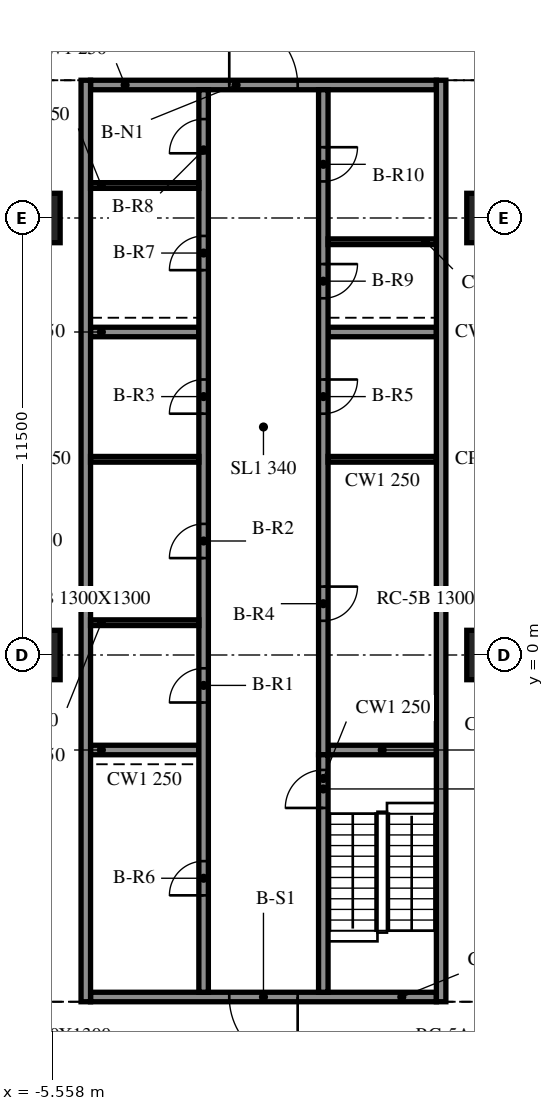
"""IFC4 building model, lengths in metres.
Left out: names, types, materials, properties, quantities, classifications, styles, units other than length and angle.
Written with IfcOpenShell. Run it as: python <this file> out.ifc"""

import sys

from ifc_helpers import new_model, si_unit, direction, frame, frame_2d, origin, origin_2d, place, context, subcontext, project, spatial, rectangle, extrude, element, fill, save


model = new_model("IFC4")
c1 = context("Model", 3, precision=1e-05, world=origin(), true_north=direction((0.0, 1.0)))
c2 = subcontext(c1, "Body", "Model", "MODEL_VIEW")
j1 = project(units=[si_unit("LENGTHUNIT", "METRE"), si_unit("PLANEANGLEUNIT", "RADIAN")], contexts=[c1])
p1 = place(None, origin())
s1 = spatial("IfcSite", under=j1, at=p1, CompositionType="ELEMENT")
p2 = place(p1, origin())
s2 = spatial("IfcBuilding", under=s1, at=p2, CompositionType="ELEMENT")
p3 = place(p2, frame((0.0, 0.0, 126.1)))
s3 = spatial("IfcBuildingStorey", under=s2, at=p3, CompositionType="ELEMENT", Elevation=126.1)
for number, where, z_axis, x_axis in (
    (1, (-6.0, 0.0, -0.34), (0.0, 0.0, 1.0), (1.0, 0.0, 0.0)),
    (2, (-6.0, 11.5, -0.34), (0.0, 0.0, 1.0), (1.0, 0.0, 0.0)),
    (3, (6.0, 0.0, -0.34), (0.0, 0.0, 1.0), (1.0, 0.0, 0.0)),
    (4, (6.0, 11.5, -0.34), (0.0, 0.0, 1.0), (1.0, 0.0, 0.0)),
):
    element("IfcColumn", number, at=place(p3, frame(where, z_axis=z_axis, x_axis=x_axis)), inside=s3, PredefinedType="COLUMN", context=c2, shape_type="SweptSolid", body=[
        extrude(rectangle(XDim=1.3, YDim=1.3, at=origin_2d()), origin(), (0.0, 0.0, 1.0), 4.1),
    ])
for number, where, z_axis, x_axis in (
    (5, (-4.675, 15.125, 0.0), (0.0, 0.0, 1.0), (0.0, -1.0, 0.0)),
    (6, (4.675, -9.125, 0.0), (0.0, 0.0, 1.0), (0.0, 1.0, 0.0)),
):
    element("IfcWall", number, at=place(p3, frame(where, z_axis=z_axis, x_axis=x_axis)), inside=s3, PredefinedType="SOLIDWALL", context=c2, shape_type="SweptSolid", body=[
        extrude(rectangle(XDim=24.25, YDim=0.25, at=frame_2d((12.125, 0.0))), origin(), (0.0, 0.0, 1.0), 3.76),
    ])
p4 = place(p3, frame((4.55, -9.0, 0.0), z_axis=(0.0, 0.0, 1.0), x_axis=(-1.0, 0.0, 0.0)))
e7 = element("IfcWall", 7, at=p4, inside=s3, PredefinedType="SOLIDWALL", context=c2, shape_type="SweptSolid", body=[
    extrude(rectangle(XDim=9.1, YDim=0.25, at=frame_2d((4.55, 0.0))), origin(), (0.0, 0.0, 1.0), 3.76),
])
p5 = place(p4, frame((3.65, 0.0, 0.0)))
e8 = element("IfcOpeningElement", 8, at=p5, cuts=e7, PredefinedType="OPENING", context=c2, shape_type="SweptSolid", body=[
    extrude(rectangle(XDim=1.8, YDim=2.1, at=frame_2d((0.9, 1.05))), frame((0.0, 0.135, 0.0), z_axis=(0.0, -1.0, 0.0), x_axis=(1.0, 0.0, 0.0)), (0.0, 0.0, 1.0), 0.27),
])
p6 = place(p3, frame((-4.55, 15.0, 0.0), z_axis=(0.0, 0.0, 1.0), x_axis=(1.0, 0.0, 0.0)))
e9 = element("IfcWall", 9, at=p6, inside=s3, PredefinedType="SOLIDWALL", context=c2, shape_type="SweptSolid", body=[
    extrude(rectangle(XDim=9.1, YDim=0.25, at=frame_2d((4.55, 0.0))), origin(), (0.0, 0.0, 1.0), 3.76),
])
p7 = place(p6, frame((3.65, 0.0, 0.0)))
e10 = element("IfcOpeningElement", 10, at=p7, cuts=e9, PredefinedType="OPENING", context=c2, shape_type="SweptSolid", body=[
    extrude(rectangle(XDim=1.8, YDim=2.1, at=frame_2d((0.9, 1.05))), frame((0.0, 0.135, 0.0), z_axis=(0.0, -1.0, 0.0), x_axis=(1.0, 0.0, 0.0)), (0.0, 0.0, 1.0), 0.27),
])
p8 = place(p3, frame((-1.575, -8.875, 0.0), z_axis=(0.0, 0.0, 1.0), x_axis=(0.0, 1.0, 0.0)))
e11 = element("IfcWall", 11, at=p8, inside=s3, PredefinedType="SOLIDWALL", context=c2, shape_type="SweptSolid", body=[
    extrude(rectangle(XDim=23.75, YDim=0.25, at=frame_2d((11.875, 0.0))), origin(), (0.0, 0.0, 1.0), 3.76),
])
p9 = place(p8, frame((7.625, 0.0, 0.0)))
e12 = element("IfcOpeningElement", 12, at=p9, cuts=e11, PredefinedType="OPENING", context=c2, shape_type="SweptSolid", body=[
    extrude(rectangle(XDim=0.9, YDim=2.1, at=frame_2d((0.45, 1.05))), frame((0.0, 0.135, 0.0), z_axis=(0.0, -1.0, 0.0), x_axis=(1.0, 0.0, 0.0)), (0.0, 0.0, 1.0), 0.27),
])
p10 = place(p8, frame((11.425, 0.0, 0.0)))
e13 = element("IfcOpeningElement", 13, at=p10, cuts=e11, PredefinedType="OPENING", context=c2, shape_type="SweptSolid", body=[
    extrude(rectangle(XDim=0.9, YDim=2.1, at=frame_2d((0.45, 1.05))), frame((0.0, 0.135, 0.0), z_axis=(0.0, -1.0, 0.0), x_axis=(1.0, 0.0, 0.0)), (0.0, 0.0, 1.0), 0.27),
])
p11 = place(p8, frame((15.225, 0.0, 0.0)))
e14 = element("IfcOpeningElement", 14, at=p11, cuts=e11, PredefinedType="OPENING", context=c2, shape_type="SweptSolid", body=[
    extrude(rectangle(XDim=0.9, YDim=2.1, at=frame_2d((0.45, 1.05))), frame((0.0, 0.135, 0.0), z_axis=(0.0, -1.0, 0.0), x_axis=(1.0, 0.0, 0.0)), (0.0, 0.0, 1.0), 0.27),
])
p12 = place(p8, frame((2.55, 0.0, 0.0)))
e15 = element("IfcOpeningElement", 15, at=p12, cuts=e11, PredefinedType="OPENING", context=c2, shape_type="SweptSolid", body=[
    extrude(rectangle(XDim=0.9, YDim=2.1, at=frame_2d((0.45, 1.05))), frame((0.0, 0.135, 0.0), z_axis=(0.0, -1.0, 0.0), x_axis=(1.0, 0.0, 0.0)), (0.0, 0.0, 1.0), 0.27),
])
p13 = place(p8, frame((19.002, 0.0, 0.0)))
e16 = element("IfcOpeningElement", 16, at=p13, cuts=e11, PredefinedType="OPENING", context=c2, shape_type="SweptSolid", body=[
    extrude(rectangle(XDim=0.9, YDim=2.1, at=frame_2d((0.45, 1.05))), frame((0.0, 0.135, 0.0), z_axis=(0.0, -1.0, 0.0), x_axis=(1.0, 0.0, 0.0)), (0.0, 0.0, 1.0), 0.27),
])
p14 = place(p8, frame((22.077, 0.0, 0.0)))
e17 = element("IfcOpeningElement", 17, at=p14, cuts=e11, PredefinedType="OPENING", context=c2, shape_type="SweptSolid", body=[
    extrude(rectangle(XDim=0.9, YDim=2.1, at=frame_2d((0.45, 1.05))), frame((0.0, 0.135, 0.0), z_axis=(0.0, -1.0, 0.0), x_axis=(1.0, 0.0, 0.0)), (0.0, 0.0, 1.0), 0.27),
])
p15 = place(p3, frame((1.575, -8.875, 0.0), z_axis=(0.0, 0.0, 1.0), x_axis=(0.0, 1.0, 0.0)))
e18 = element("IfcWall", 18, at=p15, inside=s3, PredefinedType="SOLIDWALL", context=c2, shape_type="SweptSolid", body=[
    extrude(rectangle(XDim=6.25, YDim=0.25, at=frame_2d((3.125, 0.0))), origin(), (0.0, 0.0, 1.0), 3.76),
])
p16 = place(p15, frame((4.85, 0.0, 0.0)))
e19 = element("IfcOpeningElement", 19, at=p16, cuts=e18, PredefinedType="OPENING", context=c2, shape_type="SweptSolid", body=[
    extrude(rectangle(XDim=1.0, YDim=2.1, at=frame_2d((0.5, 1.05))), frame((0.0, 0.135, 0.0), z_axis=(0.0, -1.0, 0.0), x_axis=(1.0, 0.0, 0.0)), (0.0, 0.0, 1.0), 0.27),
])
p17 = place(p3, frame((1.575, 14.875, 0.0), z_axis=(0.0, 0.0, 1.0), x_axis=(0.0, -1.0, 0.0)))
e20 = element("IfcWall", 20, at=p17, inside=s3, PredefinedType="SOLIDWALL", context=c2, shape_type="SweptSolid", body=[
    extrude(rectangle(XDim=17.5, YDim=0.25, at=frame_2d((8.75, 0.0))), origin(), (0.0, 0.0, 1.0), 3.76),
])
p18 = place(p17, frame((13.075, 0.0, 0.0)))
e21 = element("IfcOpeningElement", 21, at=p18, cuts=e20, PredefinedType="OPENING", context=c2, shape_type="SweptSolid", body=[
    extrude(rectangle(XDim=0.9, YDim=2.1, at=frame_2d((0.45, 1.05))), frame((0.0, 0.135, 0.0), z_axis=(0.0, -1.0, 0.0), x_axis=(1.0, 0.0, 0.0)), (0.0, 0.0, 1.0), 0.27),
])
p19 = place(p17, frame((7.625, 0.0, 0.0)))
e22 = element("IfcOpeningElement", 22, at=p19, cuts=e20, PredefinedType="OPENING", context=c2, shape_type="SweptSolid", body=[
    extrude(rectangle(XDim=0.9, YDim=2.1, at=frame_2d((0.45, 1.05))), frame((0.0, 0.135, 0.0), z_axis=(0.0, -1.0, 0.0), x_axis=(1.0, 0.0, 0.0)), (0.0, 0.0, 1.0), 0.27),
])
p20 = place(p17, frame((4.587, 0.0, 0.0)))
e23 = element("IfcOpeningElement", 23, at=p20, cuts=e20, PredefinedType="OPENING", context=c2, shape_type="SweptSolid", body=[
    extrude(rectangle(XDim=0.9, YDim=2.1, at=frame_2d((0.45, 1.05))), frame((0.0, 0.135, 0.0), z_axis=(0.0, -1.0, 0.0), x_axis=(1.0, 0.0, 0.0)), (0.0, 0.0, 1.0), 0.27),
])
p21 = place(p17, frame((1.512, 0.0, 0.0)))
e24 = element("IfcOpeningElement", 24, at=p21, cuts=e20, PredefinedType="OPENING", context=c2, shape_type="SweptSolid", body=[
    extrude(rectangle(XDim=0.9, YDim=2.1, at=frame_2d((0.45, 1.05))), frame((0.0, 0.135, 0.0), z_axis=(0.0, -1.0, 0.0), x_axis=(1.0, 0.0, 0.0)), (0.0, 0.0, 1.0), 0.27),
])
for number, where, z_axis, x_axis in (
    (25, (-4.55, -2.5, 0.0), (0.0, 0.0, 1.0), (1.0, 0.0, 0.0)),
    (26, (-4.55, 8.5, 0.0), (0.0, 0.0, 1.0), (1.0, 0.0, 0.0)),
    (27, (1.7, -2.5, 0.0), (0.0, 0.0, 1.0), (1.0, 0.0, 0.0)),
    (28, (1.7, 8.5, 0.0), (0.0, 0.0, 1.0), (1.0, 0.0, 0.0)),
):
    element("IfcWall", number, at=place(p3, frame(where, z_axis=z_axis, x_axis=x_axis)), inside=s3, PredefinedType="SOLIDWALL", context=c2, shape_type="SweptSolid", body=[
        extrude(rectangle(XDim=2.85, YDim=0.25, at=frame_2d((1.425, 0.0))), origin(), (0.0, 0.0, 1.0), 3.76),
    ])
for number, where, z_axis, x_axis in (
    (29, (-4.55, 0.85, 0.0), (0.0, 0.0, 1.0), (1.0, 0.0, 0.0)),
    (30, (-4.55, 5.15, 0.0), (0.0, 0.0, 1.0), (1.0, 0.0, 0.0)),
    (31, (1.7, 5.15, 0.0), (0.0, 0.0, 1.0), (1.0, 0.0, 0.0)),
    (32, (-4.55, 12.355, 0.0), (0.0, 0.0, 1.0), (1.0, 0.0, 0.0)),
    (33, (1.7, 10.875, 0.0), (0.0, 0.0, 1.0), (1.0, 0.0, 0.0)),
):
    element("IfcWall", number, at=place(p3, frame(where, z_axis=z_axis, x_axis=x_axis)), inside=s3, PredefinedType="PARTITIONING", context=c2, shape_type="SweptSolid", body=[
        extrude(rectangle(XDim=2.85, YDim=0.15, at=frame_2d((1.425, 0.0))), origin(), (0.0, 0.0, 1.0), 3.76),
    ])
p22 = place(p5, origin())
e34 = element("IfcDoor", 34, at=p22, inside=s3, OperationType="DOUBLE_DOOR_SINGLE_SWING", PredefinedType="DOOR", context=c2, shape_type="SweptSolid", body=[
    extrude(rectangle(XDim=1.8, YDim=2.1, at=frame_2d((0.9, 1.05))), frame((0.0, 0.025, 0.0), z_axis=(0.0, -1.0, 0.0), x_axis=(1.0, 0.0, 0.0)), (0.0, 0.0, 1.0), 0.05),
])
fill(e8, e34)
p23 = place(p7, origin())
e35 = element("IfcDoor", 35, at=p23, inside=s3, OperationType="DOUBLE_DOOR_SINGLE_SWING", PredefinedType="DOOR", context=c2, shape_type="SweptSolid", body=[
    extrude(rectangle(XDim=1.8, YDim=2.1, at=frame_2d((0.9, 1.05))), frame((0.0, 0.025, 0.0), z_axis=(0.0, -1.0, 0.0), x_axis=(1.0, 0.0, 0.0)), (0.0, 0.0, 1.0), 0.05),
])
fill(e10, e35)
p24 = place(p9, origin())
e36 = element("IfcDoor", 36, at=p24, inside=s3, OperationType="SINGLE_SWING_LEFT", PredefinedType="DOOR", context=c2, shape_type="SweptSolid", body=[
    extrude(rectangle(XDim=0.9, YDim=2.1, at=frame_2d((0.45, 1.05))), frame((0.0, 0.025, 0.0), z_axis=(0.0, -1.0, 0.0), x_axis=(1.0, 0.0, 0.0)), (0.0, 0.0, 1.0), 0.05),
])
fill(e12, e36)
p25 = place(p10, origin())
e37 = element("IfcDoor", 37, at=p25, inside=s3, OperationType="SINGLE_SWING_RIGHT", PredefinedType="DOOR", context=c2, shape_type="SweptSolid", body=[
    extrude(rectangle(XDim=0.9, YDim=2.1, at=frame_2d((0.45, 1.05))), frame((0.0, 0.025, 0.0), z_axis=(0.0, -1.0, 0.0), x_axis=(1.0, 0.0, 0.0)), (0.0, 0.0, 1.0), 0.05),
])
fill(e13, e37)
p26 = place(p11, origin())
e38 = element("IfcDoor", 38, at=p26, inside=s3, OperationType="SINGLE_SWING_LEFT", PredefinedType="DOOR", context=c2, shape_type="SweptSolid", body=[
    extrude(rectangle(XDim=0.9, YDim=2.1, at=frame_2d((0.45, 1.05))), frame((0.0, 0.025, 0.0), z_axis=(0.0, -1.0, 0.0), x_axis=(1.0, 0.0, 0.0)), (0.0, 0.0, 1.0), 0.05),
])
fill(e14, e38)
p27 = place(p18, origin())
e39 = element("IfcDoor", 39, at=p27, inside=s3, OperationType="SINGLE_SWING_RIGHT", PredefinedType="DOOR", context=c2, shape_type="SweptSolid", body=[
    extrude(rectangle(XDim=0.9, YDim=2.1, at=frame_2d((0.45, 1.05))), frame((0.0, 0.025, 0.0), z_axis=(0.0, -1.0, 0.0), x_axis=(1.0, 0.0, 0.0)), (0.0, 0.0, 1.0), 0.05),
])
fill(e21, e39)
p28 = place(p19, origin())
e40 = element("IfcDoor", 40, at=p28, inside=s3, OperationType="SINGLE_SWING_LEFT", PredefinedType="DOOR", context=c2, shape_type="SweptSolid", body=[
    extrude(rectangle(XDim=0.9, YDim=2.1, at=frame_2d((0.45, 1.05))), frame((0.0, 0.025, 0.0), z_axis=(0.0, -1.0, 0.0), x_axis=(1.0, 0.0, 0.0)), (0.0, 0.0, 1.0), 0.05),
])
fill(e22, e40)
p29 = place(p12, origin())
e41 = element("IfcDoor", 41, at=p29, inside=s3, OperationType="SINGLE_SWING_RIGHT", PredefinedType="DOOR", context=c2, shape_type="SweptSolid", body=[
    extrude(rectangle(XDim=0.9, YDim=2.1, at=frame_2d((0.45, 1.05))), frame((0.0, 0.025, 0.0), z_axis=(0.0, -1.0, 0.0), x_axis=(1.0, 0.0, 0.0)), (0.0, 0.0, 1.0), 0.05),
])
fill(e15, e41)
p30 = place(p13, origin())
e42 = element("IfcDoor", 42, at=p30, inside=s3, OperationType="SINGLE_SWING_LEFT", PredefinedType="DOOR", context=c2, shape_type="SweptSolid", body=[
    extrude(rectangle(XDim=0.9, YDim=2.1, at=frame_2d((0.45, 1.05))), frame((0.0, 0.025, 0.0), z_axis=(0.0, -1.0, 0.0), x_axis=(1.0, 0.0, 0.0)), (0.0, 0.0, 1.0), 0.05),
])
fill(e16, e42)
p31 = place(p14, origin())
e43 = element("IfcDoor", 43, at=p31, inside=s3, OperationType="SINGLE_SWING_RIGHT", PredefinedType="DOOR", context=c2, shape_type="SweptSolid", body=[
    extrude(rectangle(XDim=0.9, YDim=2.1, at=frame_2d((0.45, 1.05))), frame((0.0, 0.025, 0.0), z_axis=(0.0, -1.0, 0.0), x_axis=(1.0, 0.0, 0.0)), (0.0, 0.0, 1.0), 0.05),
])
fill(e17, e43)
p32 = place(p20, origin())
e44 = element("IfcDoor", 44, at=p32, inside=s3, OperationType="SINGLE_SWING_LEFT", PredefinedType="DOOR", context=c2, shape_type="SweptSolid", body=[
    extrude(rectangle(XDim=0.9, YDim=2.1, at=frame_2d((0.45, 1.05))), frame((0.0, 0.025, 0.0), z_axis=(0.0, -1.0, 0.0), x_axis=(1.0, 0.0, 0.0)), (0.0, 0.0, 1.0), 0.05),
])
fill(e23, e44)
p33 = place(p21, origin())
e45 = element("IfcDoor", 45, at=p33, inside=s3, OperationType="SINGLE_SWING_RIGHT", PredefinedType="DOOR", context=c2, shape_type="SweptSolid", body=[
    extrude(rectangle(XDim=0.9, YDim=2.1, at=frame_2d((0.45, 1.05))), frame((0.0, 0.025, 0.0), z_axis=(0.0, -1.0, 0.0), x_axis=(1.0, 0.0, 0.0)), (0.0, 0.0, 1.0), 0.05),
])
fill(e24, e45)
p34 = place(p16, origin())
e46 = element("IfcDoor", 46, at=p34, inside=s3, OperationType="SINGLE_SWING_LEFT", PredefinedType="DOOR", context=c2, shape_type="SweptSolid", body=[
    extrude(rectangle(XDim=1.0, YDim=2.1, at=frame_2d((0.5, 1.05))), frame((0.0, 0.025, 0.0), z_axis=(0.0, -1.0, 0.0), x_axis=(1.0, 0.0, 0.0)), (0.0, 0.0, 1.0), 0.05),
])
fill(e19, e46)
save(model, sys.argv[1])
